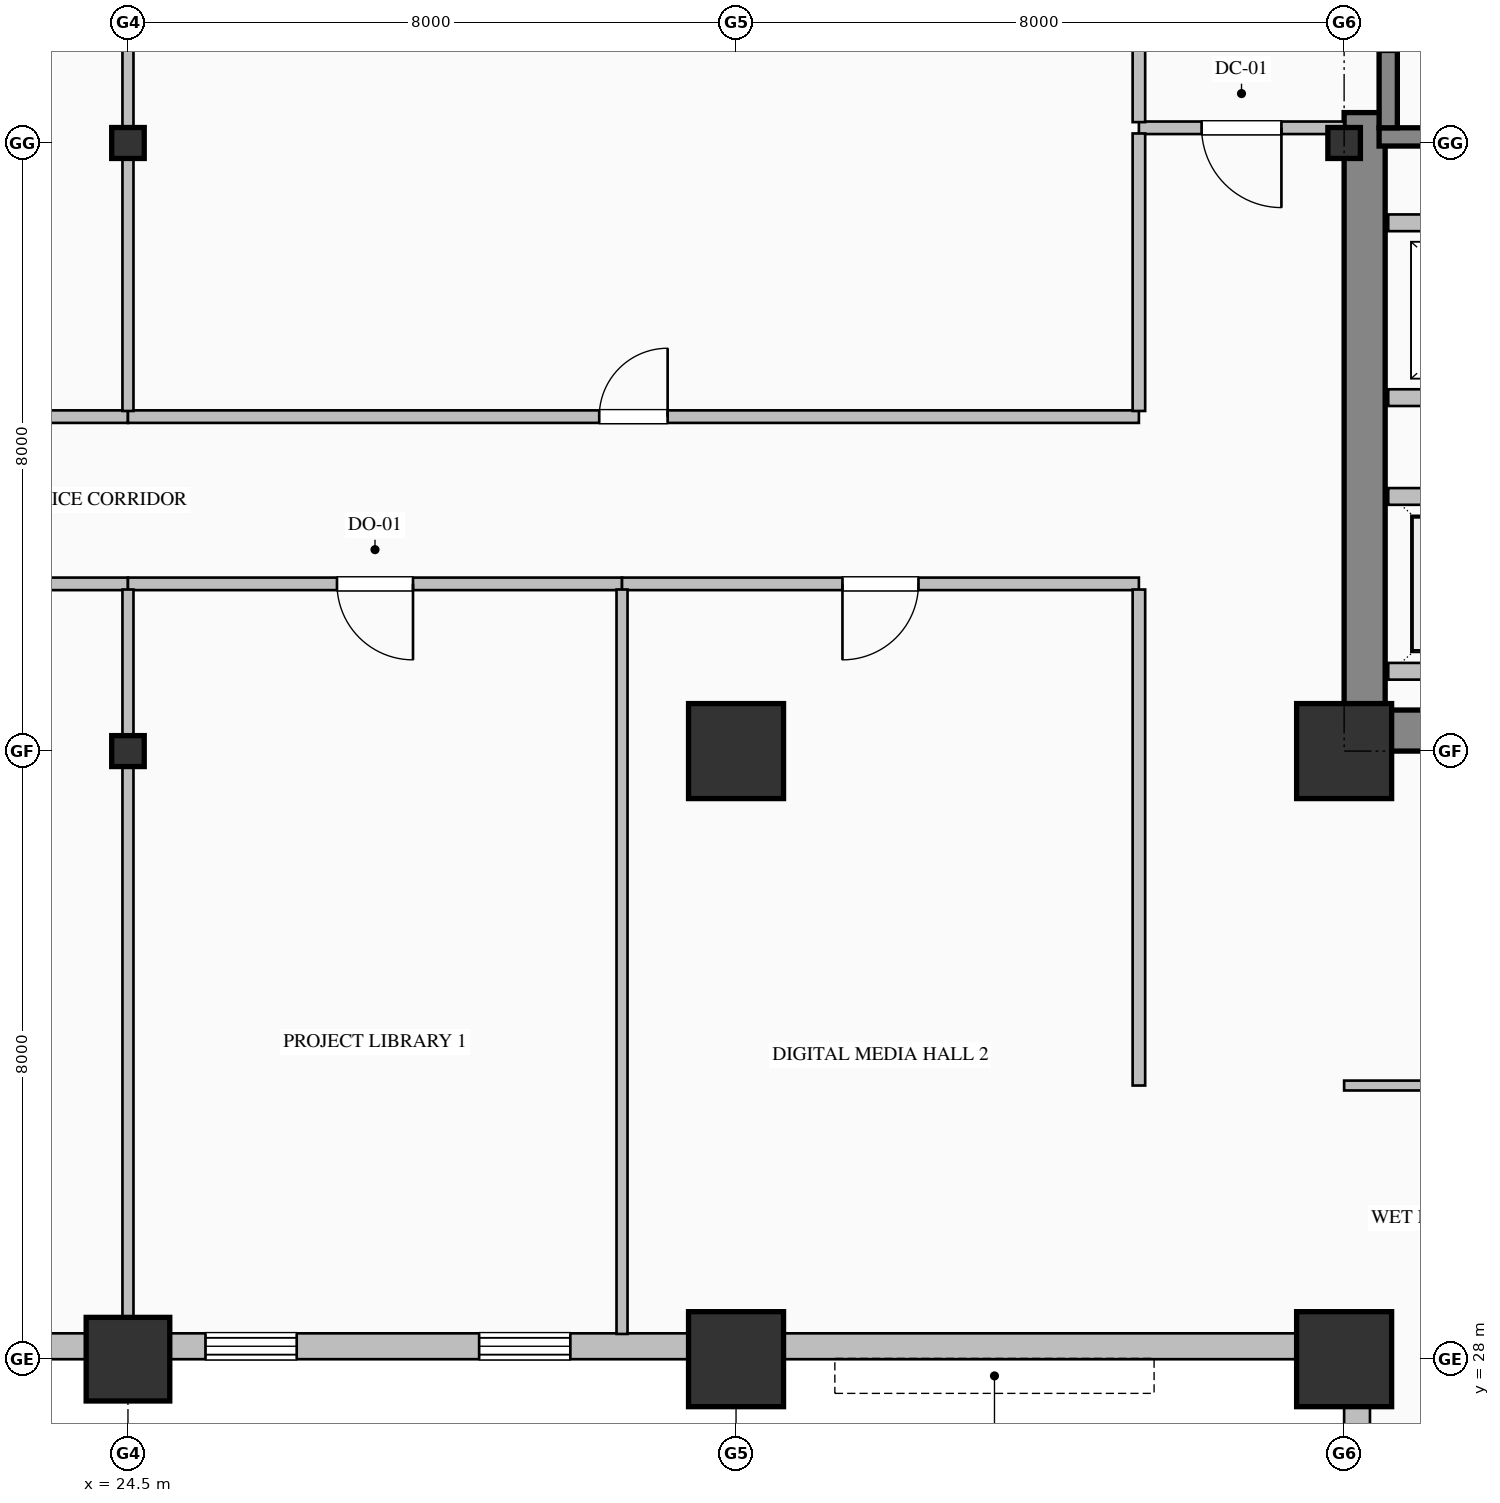
"""IFC4 building model, lengths in metres.
Left out: names, types, materials, properties, quantities, classifications, styles, units other than length and angle.
Written with IfcOpenShell. Run it as: python <this file> out.ifc"""

import sys

from ifc_helpers import new_model, si_unit, direction, frame, frame_2d, origin, origin_2d, place, context, subcontext, project, spatial, rectangle, hollow_rectangle, i_section, extrude, element, fill, save


model = new_model("IFC4")
c1 = context("Model", 3, precision=1e-05, world=origin(), true_north=direction((0.0, 1.0)))
c2 = subcontext(c1, "Body", "Model", "MODEL_VIEW")
j1 = project(units=[si_unit("LENGTHUNIT", "METRE"), si_unit("PLANEANGLEUNIT", "RADIAN")], contexts=[c1])
p1 = place(None, origin())
s1 = spatial("IfcSite", under=j1, at=p1, CompositionType="ELEMENT")
p2 = place(p1, origin())
s2 = spatial("IfcBuilding", under=s1, at=p2, CompositionType="ELEMENT")
p3 = place(p2, frame((0.0, 0.0, 60.2)))
s3 = spatial("IfcBuildingStorey", under=s2, at=p3, CompositionType="ELEMENT", Elevation=60.2)
p4 = place(p3, frame((40.77, 36.54, 0.0), z_axis=(0.0, 0.0, 1.0), x_axis=(0.0, 1.0, 0.0)))
e1 = element("IfcWall", 1, at=p4, inside=s3, PredefinedType="SHEAR", context=c2, shape_type="SweptSolid", body=[
    extrude(rectangle(XDim=7.86, YDim=0.54, at=frame_2d((3.93, 0.0))), origin(), (0.0, 0.0, 1.0), 3.75),
])
p5 = place(p3, frame((40.5, 36.27, 0.0), z_axis=(0.0, 0.0, 1.0), x_axis=(1.0, 0.0, 0.0)))
e2 = element("IfcWall", 2, at=p5, inside=s3, PredefinedType="SHEAR", context=c2, shape_type="SweptSolid", body=[
    extrude(rectangle(XDim=1.7, YDim=0.54, at=frame_2d((0.85, 0.0))), origin(), (0.0, 0.0, 1.0), 3.75),
])
p6 = place(p3, frame((24.5, 28.0, 0.0), z_axis=(0.0, 0.0, 1.0), x_axis=(1.0, 0.0, 0.0)))
e3 = element("IfcColumn", 3, at=p6, inside=s3, PredefinedType="COLUMN", context=c2, shape_type="SweptSolid", body=[
    extrude(hollow_rectangle(XDim=1.1, YDim=1.1, WallThickness=0.04, at=origin_2d()), origin(), (0.0, 0.0, 1.0), 4.0),
])
for number, where, z_axis, x_axis in (
    (4, (24.5, 36.0, 0.0), (0.0, 0.0, 1.0), (1.0, 0.0, 0.0)),
    (5, (24.5, 44.0, 0.0), (0.0, 0.0, 1.0), (1.0, 0.0, 0.0)),
):
    element("IfcColumn", number, at=place(p3, frame(where, z_axis=z_axis, x_axis=x_axis)), inside=s3, PredefinedType="COLUMN", context=c2, shape_type="SweptSolid", body=[
        extrude(i_section(OverallWidth=0.407, OverallDepth=0.428, WebThickness=0.02, FlangeThickness=0.035, FilletRadius=0.022, at=origin_2d()), origin(), (0.0, 0.0, 1.0), 4.0),
    ])
for number, where, z_axis, x_axis in (
    (6, (32.5, 28.0, 0.0), (0.0, 0.0, 1.0), (1.0, 0.0, 0.0)),
    (7, (32.5, 36.0, 0.0), (0.0, 0.0, 1.0), (1.0, 0.0, 0.0)),
    (8, (40.5, 28.0, 0.0), (0.0, 0.0, 1.0), (1.0, 0.0, 0.0)),
    (9, (40.5, 36.0, 0.0), (0.0, 0.0, 1.0), (1.0, 0.0, 0.0)),
):
    element("IfcColumn", number, at=place(p3, frame(where, z_axis=z_axis, x_axis=x_axis)), inside=s3, PredefinedType="COLUMN", context=c2, shape_type="SweptSolid", body=[
        extrude(hollow_rectangle(XDim=1.25, YDim=1.25, WallThickness=0.045, at=origin_2d()), origin(), (0.0, 0.0, 1.0), 4.0),
    ])
p7 = place(p3, frame((40.5, 44.0, 0.0), z_axis=(0.0, 0.0, 1.0), x_axis=(1.0, 0.0, 0.0)))
e10 = element("IfcColumn", 10, at=p7, inside=s3, PredefinedType="COLUMN", context=c2, shape_type="SweptSolid", body=[
    extrude(i_section(OverallWidth=0.407, OverallDepth=0.428, WebThickness=0.02, FlangeThickness=0.035, FilletRadius=0.022, at=origin_2d()), origin(), (0.0, 0.0, 1.0), 4.0),
])
p8 = place(p3, frame((40.67, 8.0, 0.0), z_axis=(0.0, 0.0, 1.0), x_axis=(0.0, 1.0, 0.0)))
e11 = element("IfcWall", 11, at=p8, inside=s3, PredefinedType="SOLIDWALL", context=c2, shape_type="SweptSolid", body=[
    extrude(rectangle(XDim=20.34, YDim=0.34, at=frame_2d((10.17, 0.0))), origin(), (0.0, 0.0, 1.0), 3.05),
])
p9 = place(p8, frame((6.6, 0.0, 0.7)))
e12 = element("IfcOpeningElement", 12, at=p9, cuts=e11, PredefinedType="OPENING", context=c2, shape_type="SweptSolid", body=[
    extrude(rectangle(XDim=1.2, YDim=1.85, at=frame_2d((0.6, 0.925))), frame((0.0, 0.18, 0.0), z_axis=(0.0, -1.0, 0.0), x_axis=(1.0, 0.0, 0.0)), (0.0, 0.0, 1.0), 0.36),
])
p10 = place(p8, frame((13.8, 0.0, 0.7)))
e13 = element("IfcOpeningElement", 13, at=p10, cuts=e11, PredefinedType="OPENING", context=c2, shape_type="SweptSolid", body=[
    extrude(rectangle(XDim=1.2, YDim=1.85, at=frame_2d((0.6, 0.925))), frame((0.0, 0.18, 0.0), z_axis=(0.0, -1.0, 0.0), x_axis=(1.0, 0.0, 0.0)), (0.0, 0.0, 1.0), 0.36),
])
p11 = place(p3, frame((40.52, 28.17, 0.0), z_axis=(0.0, 0.0, 1.0), x_axis=(-1.0, 0.0, 0.0)))
e14 = element("IfcWall", 14, at=p11, inside=s3, PredefinedType="SOLIDWALL", context=c2, shape_type="SweptSolid", body=[
    extrude(rectangle(XDim=36.52, YDim=0.34, at=frame_2d((18.26, 0.0))), origin(), (0.0, 0.0, 1.0), 3.05),
])
p12 = place(p11, frame((10.2, 0.0, 0.7)))
e15 = element("IfcOpeningElement", 15, at=p12, cuts=e14, PredefinedType="OPENING", context=c2, shape_type="SweptSolid", body=[
    extrude(rectangle(XDim=1.2, YDim=1.85, at=frame_2d((0.6, 0.925))), frame((0.0, 0.18, 0.0), z_axis=(0.0, -1.0, 0.0), x_axis=(1.0, 0.0, 0.0)), (0.0, 0.0, 1.0), 0.36),
])
p13 = place(p11, frame((13.8, 0.0, 0.7)))
e16 = element("IfcOpeningElement", 16, at=p13, cuts=e14, PredefinedType="OPENING", context=c2, shape_type="SweptSolid", body=[
    extrude(rectangle(XDim=1.2, YDim=1.85, at=frame_2d((0.6, 0.925))), frame((0.0, 0.18, 0.0), z_axis=(0.0, -1.0, 0.0), x_axis=(1.0, 0.0, 0.0)), (0.0, 0.0, 1.0), 0.36),
])
p14 = place(p11, frame((17.4, 0.0, 0.7)))
e17 = element("IfcOpeningElement", 17, at=p14, cuts=e14, PredefinedType="OPENING", context=c2, shape_type="SweptSolid", body=[
    extrude(rectangle(XDim=1.2, YDim=1.85, at=frame_2d((0.6, 0.925))), frame((0.0, 0.18, 0.0), z_axis=(0.0, -1.0, 0.0), x_axis=(1.0, 0.0, 0.0)), (0.0, 0.0, 1.0), 0.36),
])
p15 = place(p11, frame((21.0, 0.0, 0.7)))
e18 = element("IfcOpeningElement", 18, at=p15, cuts=e14, PredefinedType="OPENING", context=c2, shape_type="SweptSolid", body=[
    extrude(rectangle(XDim=1.2, YDim=1.85, at=frame_2d((0.6, 0.925))), frame((0.0, 0.18, 0.0), z_axis=(0.0, -1.0, 0.0), x_axis=(1.0, 0.0, 0.0)), (0.0, 0.0, 1.0), 0.36),
])
p16 = place(p11, frame((28.2, 0.0, 0.7)))
e19 = element("IfcOpeningElement", 19, at=p16, cuts=e14, PredefinedType="OPENING", context=c2, shape_type="SweptSolid", body=[
    extrude(rectangle(XDim=1.2, YDim=1.85, at=frame_2d((0.6, 0.925))), frame((0.0, 0.18, 0.0), z_axis=(0.0, -1.0, 0.0), x_axis=(1.0, 0.0, 0.0)), (0.0, 0.0, 1.0), 0.36),
])
p17 = place(p3, frame((49.04, 44.08, 0.0), z_axis=(0.0, 0.0, 1.0), x_axis=(-1.0, 0.0, 0.0)))
e20 = element("IfcWall", 20, at=p17, inside=s3, PredefinedType="SOLIDWALL", context=c2, shape_type="SweptSolid", body=[
    extrude(rectangle(XDim=8.08, YDim=0.24, at=frame_2d((4.04, 0.0))), origin(), (0.0, 0.0, 1.0), 4.0),
])
p18 = place(p3, frame((41.08, 47.35, 0.0), z_axis=(0.0, 0.0, 1.0), x_axis=(0.0, -1.0, 0.0)))
e21 = element("IfcWall", 21, at=p18, inside=s3, PredefinedType="SOLIDWALL", context=c2, shape_type="SweptSolid", body=[
    extrude(rectangle(XDim=3.15, YDim=0.24, at=frame_2d((1.575, 0.0))), origin(), (0.0, 0.0, 1.0), 4.0),
])
p19 = place(p18, frame((1.0, 0.0, 0.0)))
e22 = element("IfcOpeningElement", 22, at=p19, cuts=e21, PredefinedType="OPENING", context=c2, shape_type="SweptSolid", body=[
    extrude(rectangle(XDim=1.15, YDim=2.2, at=frame_2d((0.575, 1.1))), frame((0.0, 0.13, 0.0), z_axis=(0.0, -1.0, 0.0), x_axis=(1.0, 0.0, 0.0)), (0.0, 0.0, 1.0), 0.26),
])
p20 = place(p3, frame((49.32, 37.05, 0.0), z_axis=(0.0, 0.0, 1.0), x_axis=(-1.0, 0.0, 0.0)))
e23 = element("IfcWall", 23, at=p20, inside=s3, PredefinedType="PARTITIONING", context=c2, shape_type="SweptSolid", body=[
    extrude(rectangle(XDim=8.24, YDim=0.22, at=frame_2d((4.12, 0.0))), origin(), (0.0, 0.0, 1.0), 3.75),
])
p21 = place(p20, frame((6.37, 0.0, 0.0)))
e24 = element("IfcOpeningElement", 24, at=p21, cuts=e23, PredefinedType="OPENING", context=c2, shape_type="SweptSolid", body=[
    extrude(rectangle(XDim=1.1, YDim=2.2, at=frame_2d((0.55, 1.1))), frame((0.0, 0.12, 0.0), z_axis=(0.0, -1.0, 0.0), x_axis=(1.0, 0.0, 0.0)), (0.0, 0.0, 1.0), 0.24),
])
p22 = place(p20, frame((3.57, 0.0, 0.0)))
e25 = element("IfcOpeningElement", 25, at=p22, cuts=e23, PredefinedType="OPENING", context=c2, shape_type="SweptSolid", body=[
    extrude(rectangle(XDim=1.1, YDim=2.2, at=frame_2d((0.55, 1.1))), frame((0.0, 0.12, 0.0), z_axis=(0.0, -1.0, 0.0), x_axis=(1.0, 0.0, 0.0)), (0.0, 0.0, 1.0), 0.24),
])
p23 = place(p20, frame((0.77, 0.0, 0.0)))
e26 = element("IfcOpeningElement", 26, at=p23, cuts=e23, PredefinedType="OPENING", context=c2, shape_type="SweptSolid", body=[
    extrude(rectangle(XDim=1.1, YDim=2.2, at=frame_2d((0.55, 1.1))), frame((0.0, 0.12, 0.0), z_axis=(0.0, -1.0, 0.0), x_axis=(1.0, 0.0, 0.0)), (0.0, 0.0, 1.0), 0.24),
])
for number, where, z_axis, x_axis in (
    (27, (41.08, 39.35, 0.0), (0.0, 0.0, 1.0), (1.0, 0.0, 0.0)),
    (28, (49.32, 40.65, 0.0), (0.0, 0.0, 1.0), (-1.0, 0.0, 0.0)),
    (29, (41.08, 42.95, 0.0), (0.0, 0.0, 1.0), (1.0, 0.0, 0.0)),
):
    element("IfcWall", number, at=place(p3, frame(where, z_axis=z_axis, x_axis=x_axis)), inside=s3, PredefinedType="PARTITIONING", context=c2, shape_type="SweptSolid", body=[
        extrude(rectangle(XDim=8.24, YDim=0.22, at=frame_2d((4.12, 0.0))), origin(), (0.0, 0.0, 1.0), 3.75),
    ])
p24 = place(p3, frame((40.5, 44.2, 0.0), z_axis=(0.0, 0.0, 1.0), x_axis=(-1.0, 0.0, 0.0)))
e30 = element("IfcWall", 30, at=p24, inside=s3, PredefinedType="PARTITIONING", context=c2, shape_type="SweptSolid", body=[
    extrude(rectangle(XDim=2.7, YDim=0.165, at=frame_2d((1.35, 0.0))), origin(), (0.0, 0.0, 1.0), 3.75),
])
p25 = place(p24, frame((0.825, 0.0, 0.0)))
e31 = element("IfcOpeningElement", 31, at=p25, cuts=e30, PredefinedType="OPENING", context=c2, shape_type="SweptSolid", body=[
    extrude(rectangle(XDim=1.05, YDim=2.15, at=frame_2d((0.525, 1.075))), frame((0.0, 0.093, 0.0), z_axis=(0.0, -1.0, 0.0), x_axis=(1.0, 0.0, 0.0)), (0.0, 0.0, 1.0), 0.185),
])
p26 = place(p3, frame((37.8, 44.274, 0.0), z_axis=(0.0, 0.0, 1.0), x_axis=(0.0, 1.0, 0.0)))
e32 = element("IfcWall", 32, at=p26, inside=s3, PredefinedType="PARTITIONING", context=c2, shape_type="SweptSolid", body=[
    extrude(rectangle(XDim=3.051, YDim=0.165, at=frame_2d((1.525, 0.0))), origin(), (0.0, 0.0, 1.0), 3.75),
])
p27 = place(p3, frame((24.5, 38.2, 0.0), z_axis=(0.0, 0.0, 1.0), x_axis=(-1.0, 0.0, 0.0)))
e33 = element("IfcWall", 33, at=p27, inside=s3, PredefinedType="PARTITIONING", context=c2, shape_type="SweptSolid", body=[
    extrude(rectangle(XDim=15.5, YDim=0.165, at=frame_2d((7.75, 0.0))), origin(), (0.0, 0.0, 1.0), 3.75),
])
p28 = place(p27, frame((7.25, 0.0, 0.0)))
e34 = element("IfcOpeningElement", 34, at=p28, cuts=e33, PredefinedType="OPENING", context=c2, shape_type="SweptSolid", body=[
    extrude(rectangle(XDim=1.0, YDim=2.15, at=frame_2d((0.5, 1.075))), frame((0.0, 0.093, 0.0), z_axis=(0.0, -1.0, 0.0), x_axis=(1.0, 0.0, 0.0)), (0.0, 0.0, 1.0), 0.185),
])
p29 = place(p3, frame((9.0, 40.4, 0.0), z_axis=(0.0, 0.0, 1.0), x_axis=(1.0, 0.0, 0.0)))
e35 = element("IfcWall", 35, at=p29, inside=s3, PredefinedType="PARTITIONING", context=c2, shape_type="SweptSolid", body=[
    extrude(rectangle(XDim=15.5, YDim=0.165, at=frame_2d((7.75, 0.0))), origin(), (0.0, 0.0, 1.0), 3.75),
])
p30 = place(p3, frame((24.5, 40.4, 0.0), z_axis=(0.0, 0.0, 1.0), x_axis=(1.0, 0.0, 0.0)))
e36 = element("IfcWall", 36, at=p30, inside=s3, PredefinedType="PARTITIONING", context=c2, shape_type="SweptSolid", body=[
    extrude(rectangle(XDim=13.3, YDim=0.165, at=frame_2d((6.65, 0.0))), origin(), (0.0, 0.0, 1.0), 3.75),
])
p31 = place(p30, frame((6.2, 0.0, 0.0)))
e37 = element("IfcOpeningElement", 37, at=p31, cuts=e36, PredefinedType="OPENING", context=c2, shape_type="SweptSolid", body=[
    extrude(rectangle(XDim=0.9, YDim=2.15, at=frame_2d((0.45, 1.075))), frame((0.0, 0.093, 0.0), z_axis=(0.0, -1.0, 0.0), x_axis=(1.0, 0.0, 0.0)), (0.0, 0.0, 1.0), 0.185),
])
p32 = place(p3, frame((31.0, 38.2, 0.0), z_axis=(0.0, 0.0, 1.0), x_axis=(-1.0, 0.0, 0.0)))
e38 = element("IfcWall", 38, at=p32, inside=s3, PredefinedType="PARTITIONING", context=c2, shape_type="SweptSolid", body=[
    extrude(rectangle(XDim=6.5, YDim=0.165, at=frame_2d((3.25, 0.0))), origin(), (0.0, 0.0, 1.0), 3.75),
])
p33 = place(p32, frame((2.75, 0.0, 0.0)))
e39 = element("IfcOpeningElement", 39, at=p33, cuts=e38, PredefinedType="OPENING", context=c2, shape_type="SweptSolid", body=[
    extrude(rectangle(XDim=1.0, YDim=2.15, at=frame_2d((0.5, 1.075))), frame((0.0, 0.093, 0.0), z_axis=(0.0, -1.0, 0.0), x_axis=(1.0, 0.0, 0.0)), (0.0, 0.0, 1.0), 0.185),
])
p34 = place(p3, frame((37.8, 38.2, 0.0), z_axis=(0.0, 0.0, 1.0), x_axis=(-1.0, 0.0, 0.0)))
e40 = element("IfcWall", 40, at=p34, inside=s3, PredefinedType="PARTITIONING", context=c2, shape_type="SweptSolid", body=[
    extrude(rectangle(XDim=6.8, YDim=0.165, at=frame_2d((3.4, 0.0))), origin(), (0.0, 0.0, 1.0), 3.75),
])
p35 = place(p34, frame((2.9, 0.0, 0.0)))
e41 = element("IfcOpeningElement", 41, at=p35, cuts=e40, PredefinedType="OPENING", context=c2, shape_type="SweptSolid", body=[
    extrude(rectangle(XDim=1.0, YDim=2.15, at=frame_2d((0.5, 1.075))), frame((0.0, 0.093, 0.0), z_axis=(0.0, -1.0, 0.0), x_axis=(1.0, 0.0, 0.0)), (0.0, 0.0, 1.0), 0.185),
])
p36 = place(p3, frame((37.8, 40.475, 0.0), z_axis=(0.0, 0.0, 1.0), x_axis=(0.0, 1.0, 0.0)))
e42 = element("IfcWall", 42, at=p36, inside=s3, PredefinedType="PARTITIONING", context=c2, shape_type="SweptSolid", body=[
    extrude(rectangle(XDim=3.651, YDim=0.165, at=frame_2d((1.825, 0.0))), origin(), (0.0, 0.0, 1.0), 3.75),
])
p37 = place(p3, frame((37.8, 31.6, 0.0), z_axis=(0.0, 0.0, 1.0), x_axis=(0.0, 1.0, 0.0)))
e43 = element("IfcWall", 43, at=p37, inside=s3, PredefinedType="PARTITIONING", context=c2, shape_type="SweptSolid", body=[
    extrude(rectangle(XDim=6.525, YDim=0.165, at=frame_2d((3.263, 0.0))), origin(), (0.0, 0.0, 1.0), 3.75),
])
p38 = place(p3, frame((43.0, 31.6, 0.0), z_axis=(0.0, 0.0, 1.0), x_axis=(-1.0, 0.0, 0.0)))
e44 = element("IfcWall", 44, at=p38, inside=s3, PredefinedType="PARTITIONING", context=c2, shape_type="SweptSolid", body=[
    extrude(rectangle(XDim=2.5, YDim=0.13, at=frame_2d((1.25, 0.0))), origin(), (0.0, 0.0, 1.0), 3.75),
])
p39 = place(p3, frame((24.5, 51.668, 0.0), z_axis=(0.0, 0.0, 1.0), x_axis=(0.0, -1.0, 0.0)))
e45 = element("IfcWall", 45, at=p39, inside=s3, PredefinedType="PARTITIONING", context=c2, shape_type="SweptSolid", body=[
    extrude(rectangle(XDim=11.193, YDim=0.145, at=frame_2d((5.597, 0.0))), origin(), (0.0, 0.0, 1.0), 3.042),
])
p40 = place(p3, frame((24.5, 38.125, 0.0), z_axis=(0.0, 0.0, 1.0), x_axis=(0.0, -1.0, 0.0)))
e46 = element("IfcWall", 46, at=p40, inside=s3, PredefinedType="PARTITIONING", context=c2, shape_type="SweptSolid", body=[
    extrude(rectangle(XDim=9.793, YDim=0.145, at=frame_2d((4.897, 0.0))), origin(), (0.0, 0.0, 1.0), 3.042),
])
p41 = place(p3, frame((31.0, 38.125, 0.0), z_axis=(0.0, 0.0, 1.0), x_axis=(0.0, -1.0, 0.0)))
e47 = element("IfcWall", 47, at=p41, inside=s3, PredefinedType="PARTITIONING", context=c2, shape_type="SweptSolid", body=[
    extrude(rectangle(XDim=9.793, YDim=0.145, at=frame_2d((4.897, 0.0))), origin(), (0.0, 0.0, 1.0), 3.75),
])
p42 = place(p12, origin())
e48 = element("IfcWindow", 48, at=p42, inside=s3, PartitioningType="DOUBLE_PANEL_VERTICAL", PredefinedType="WINDOW", context=c2, shape_type="SweptSolid", body=[
    extrude(rectangle(XDim=1.2, YDim=1.85, at=frame_2d((0.6, 0.925))), frame((0.0, 0.15, 0.0), z_axis=(0.0, -1.0, 0.0), x_axis=(1.0, 0.0, 0.0)), (0.0, 0.0, 1.0), 0.06),
])
fill(e15, e48)
p43 = place(p13, origin())
e49 = element("IfcWindow", 49, at=p43, inside=s3, PartitioningType="DOUBLE_PANEL_VERTICAL", PredefinedType="WINDOW", context=c2, shape_type="SweptSolid", body=[
    extrude(rectangle(XDim=1.2, YDim=1.85, at=frame_2d((0.6, 0.925))), frame((0.0, 0.15, 0.0), z_axis=(0.0, -1.0, 0.0), x_axis=(1.0, 0.0, 0.0)), (0.0, 0.0, 1.0), 0.06),
])
fill(e16, e49)
p44 = place(p25, origin())
e50 = element("IfcDoor", 50, at=p44, inside=s3, OperationType="SINGLE_SWING_LEFT", PredefinedType="DOOR", context=c2, shape_type="SweptSolid", body=[
    extrude(rectangle(XDim=1.05, YDim=2.15, at=frame_2d((0.525, 1.075))), frame((0.0, 0.025, 0.0), z_axis=(0.0, -1.0, 0.0), x_axis=(1.0, 0.0, 0.0)), (0.0, 0.0, 1.0), 0.05),
])
fill(e31, e50)
p45 = place(p31, origin())
e51 = element("IfcDoor", 51, at=p45, inside=s3, OperationType="SINGLE_SWING_RIGHT", PredefinedType="DOOR", context=c2, shape_type="SweptSolid", body=[
    extrude(rectangle(XDim=0.9, YDim=2.15, at=frame_2d((0.45, 1.075))), frame((0.0, 0.025, 0.0), z_axis=(0.0, -1.0, 0.0), x_axis=(1.0, 0.0, 0.0)), (0.0, 0.0, 1.0), 0.05),
])
fill(e37, e51)
p46 = place(p33, origin())
e52 = element("IfcDoor", 52, at=p46, inside=s3, OperationType="SINGLE_SWING_LEFT", PredefinedType="DOOR", context=c2, shape_type="SweptSolid", body=[
    extrude(rectangle(XDim=1.0, YDim=2.15, at=frame_2d((0.5, 1.075))), frame((0.0, 0.025, 0.0), z_axis=(0.0, -1.0, 0.0), x_axis=(1.0, 0.0, 0.0)), (0.0, 0.0, 1.0), 0.05),
])
fill(e39, e52)
p47 = place(p35, origin())
e53 = element("IfcDoor", 53, at=p47, inside=s3, OperationType="SINGLE_SWING_RIGHT", PredefinedType="DOOR", context=c2, shape_type="SweptSolid", body=[
    extrude(rectangle(XDim=1.0, YDim=2.15, at=frame_2d((0.5, 1.075))), frame((0.0, 0.025, 0.0), z_axis=(0.0, -1.0, 0.0), x_axis=(1.0, 0.0, 0.0)), (0.0, 0.0, 1.0), 0.05),
])
fill(e41, e53)
save(model, sys.argv[1])
